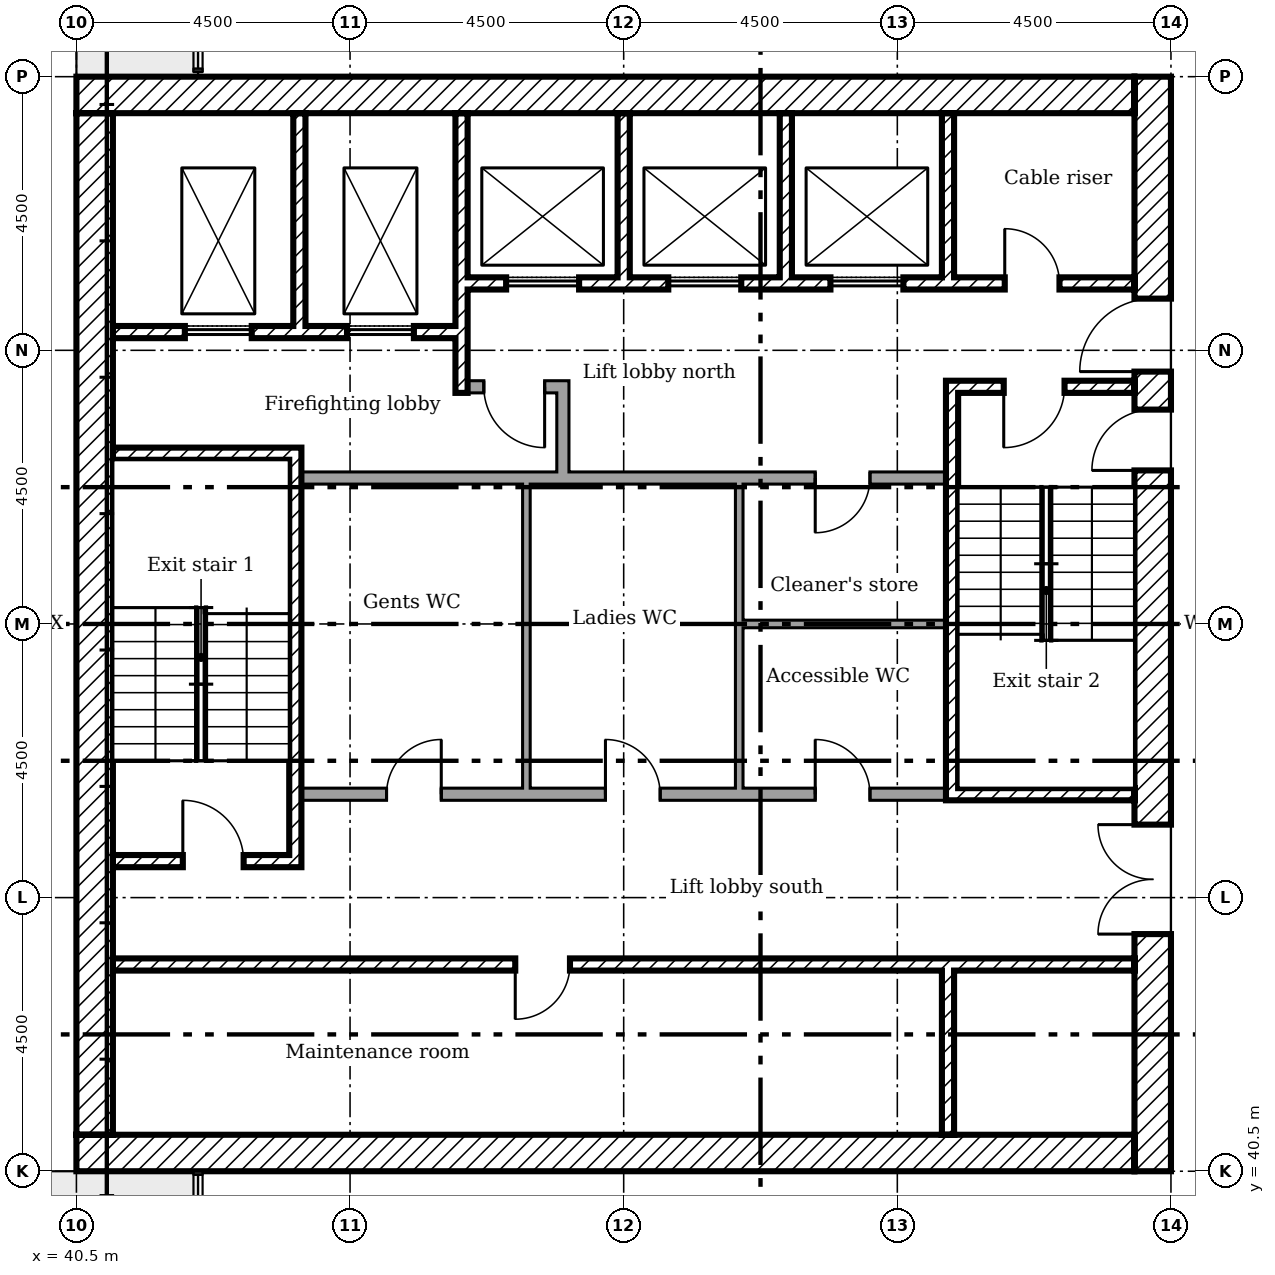
"""IFC4 building model, lengths in metres.
Left out: names, types, materials, properties, quantities, classifications, styles, units other than length and angle.
Written with IfcOpenShell. Run it as: python <this file> out.ifc"""

import sys

from ifc_helpers import new_model, si_unit, direction, frame, frame_2d, origin, place, context, subcontext, project, spatial, rectangle, extrude, element, fill, save


model = new_model("IFC4")
c1 = context("Model", 3, precision=1e-05, world=origin(), true_north=direction((0.0, 1.0)))
c2 = subcontext(c1, "Body", "Model", "MODEL_VIEW")
j1 = project(units=[si_unit("LENGTHUNIT", "METRE"), si_unit("PLANEANGLEUNIT", "RADIAN")], contexts=[c1])
p1 = place(None, origin())
s1 = spatial("IfcSite", under=j1, at=p1, CompositionType="ELEMENT")
p2 = place(p1, origin())
s2 = spatial("IfcBuilding", under=s1, at=p2, CompositionType="ELEMENT")
p3 = place(p2, frame((0.0, 0.0, 143.8)))
s3 = spatial("IfcBuildingStorey", under=s2, at=p3, CompositionType="ELEMENT", Elevation=143.8)
p4 = place(p3, frame((58.2, 40.5, 0.0), z_axis=(0.0, 0.0, 1.0), x_axis=(0.0, 1.0, 0.0)))
e1 = element("IfcWall", 1, at=p4, inside=s3, PredefinedType="SHEAR", context=c2, shape_type="SweptSolid", body=[
    extrude(rectangle(XDim=18.0, YDim=0.6, at=frame_2d((9.0, 0.0))), origin(), (0.0, 0.0, 1.0), 3.35),
])
p5 = place(p4, frame((13.15, 0.0, 0.0)))
e2 = element("IfcOpeningElement", 2, at=p5, cuts=e1, PredefinedType="OPENING", context=c2, shape_type="SweptSolid", body=[
    extrude(rectangle(XDim=1.2, YDim=2.1, at=frame_2d((0.6, 1.05))), frame((0.0, 0.31, 0.0), z_axis=(0.0, -1.0, 0.0), x_axis=(1.0, 0.0, 0.0)), (0.0, 0.0, 1.0), 0.62),
])
p6 = place(p4, frame((3.9, 0.0, 0.0)))
e3 = element("IfcOpeningElement", 3, at=p6, cuts=e1, PredefinedType="OPENING", context=c2, shape_type="SweptSolid", body=[
    extrude(rectangle(XDim=1.8, YDim=2.1, at=frame_2d((0.9, 1.05))), frame((0.0, 0.31, 0.0), z_axis=(0.0, -1.0, 0.0), x_axis=(1.0, 0.0, 0.0)), (0.0, 0.0, 1.0), 0.62),
])
p7 = place(p4, frame((11.525, 0.0, 0.0)))
e4 = element("IfcOpeningElement", 4, at=p7, cuts=e1, PredefinedType="OPENING", context=c2, shape_type="SweptSolid", body=[
    extrude(rectangle(XDim=1.0, YDim=2.1, at=frame_2d((0.5, 1.05))), frame((0.0, 0.31, 0.0), z_axis=(0.0, -1.0, 0.0), x_axis=(1.0, 0.0, 0.0)), (0.0, 0.0, 1.0), 0.62),
])
for number, where in (
    (5, (40.5, 58.2, 0.0)),
    (6, (40.5, 40.8, 0.0)),
):
    element("IfcWall", number, at=place(p3, frame(where)), inside=s3, PredefinedType="SHEAR", context=c2, shape_type="SweptSolid", body=[
        extrude(rectangle(XDim=17.4, YDim=0.6, at=frame_2d((8.7, 0.0))), origin(), (0.0, 0.0, 1.0), 3.35),
    ])
p8 = place(p3, frame((40.8, 41.1, 0.0), z_axis=(0.0, 0.0, 1.0), x_axis=(0.0, 1.0, 0.0)))
e7 = element("IfcWall", 7, at=p8, inside=s3, PredefinedType="SHEAR", context=c2, shape_type="SweptSolid", body=[
    extrude(rectangle(XDim=16.8, YDim=0.6, at=frame_2d((8.4, 0.0))), origin(), (0.0, 0.0, 1.0), 3.35),
])
p9 = place(p3, frame((44.167, 57.9, 0.0), z_axis=(0.0, 0.0, 1.0), x_axis=(0.0, -1.0, 0.0)))
e8 = element("IfcWall", 8, at=p9, inside=s3, PredefinedType="SHEAR", context=c2, shape_type="SweptSolid", body=[
    extrude(rectangle(XDim=3.5, YDim=0.2, at=frame_2d((1.75, 0.0))), origin(), (0.0, 0.0, 1.0), 3.35),
])
p10 = place(p3, frame((46.833, 57.9, 0.0), z_axis=(0.0, 0.0, 1.0), x_axis=(0.0, -1.0, 0.0)))
e9 = element("IfcWall", 9, at=p10, inside=s3, PredefinedType="SHEAR", context=c2, shape_type="SweptSolid", body=[
    extrude(rectangle(XDim=4.6, YDim=0.2, at=frame_2d((2.3, 0.0))), origin(), (0.0, 0.0, 1.0), 3.35),
])
for number, where, z_axis, x_axis in (
    (10, (49.5, 57.9, 0.0), (0.0, 0.0, 1.0), (0.0, -1.0, 0.0)),
    (11, (52.167, 57.9, 0.0), (0.0, 0.0, 1.0), (0.0, -1.0, 0.0)),
    (12, (54.833, 57.9, 0.0), (0.0, 0.0, 1.0), (0.0, -1.0, 0.0)),
    (13, (54.833, 41.1, 0.0), (0.0, 0.0, 1.0), (0.0, 1.0, 0.0)),
):
    element("IfcWall", number, at=place(p3, frame(where, z_axis=z_axis, x_axis=x_axis)), inside=s3, PredefinedType="SHEAR", context=c2, shape_type="SweptSolid", body=[
        extrude(rectangle(XDim=2.7, YDim=0.2, at=frame_2d((1.35, 0.0))), origin(), (0.0, 0.0, 1.0), 3.35),
    ])
p11 = place(p3, frame((48.5, 51.9, 0.0), z_axis=(0.0, 0.0, 1.0), x_axis=(0.0, 1.0, 0.0)))
e14 = element("IfcWall", 14, at=p11, inside=s3, PredefinedType="PARTITIONING", context=c2, shape_type="SweptSolid", body=[
    extrude(rectangle(XDim=1.6, YDim=0.2, at=frame_2d((0.8, 0.0))), origin(), (0.0, 0.0, 1.0), 3.35),
])
p12 = place(p3, frame((46.933, 53.4, 0.0)))
e15 = element("IfcWall", 15, at=p12, inside=s3, PredefinedType="PARTITIONING", context=c2, shape_type="SweptSolid", body=[
    extrude(rectangle(XDim=1.467, YDim=0.2, at=frame_2d((0.733, 0.0))), origin(), (0.0, 0.0, 1.0), 3.35),
])
p13 = place(p12, frame((0.267, 0.0, 0.0)))
e16 = element("IfcOpeningElement", 16, at=p13, cuts=e15, PredefinedType="OPENING", context=c2, shape_type="SweptSolid", body=[
    extrude(rectangle(XDim=1.0, YDim=2.1, at=frame_2d((0.5, 1.05))), frame((0.0, 0.11, 0.0), z_axis=(0.0, -1.0, 0.0), x_axis=(1.0, 0.0, 0.0)), (0.0, 0.0, 1.0), 0.22),
])
p14 = place(p3, frame((46.933, 55.1, 0.0)))
e17 = element("IfcWall", 17, at=p14, inside=s3, PredefinedType="SHEAR", context=c2, shape_type="SweptSolid", body=[
    extrude(rectangle(XDim=10.967, YDim=0.2, at=frame_2d((5.483, 0.0))), origin(), (0.0, 0.0, 1.0), 3.35),
])
p15 = place(p14, frame((8.833, 0.0, 0.0)))
e18 = element("IfcOpeningElement", 18, at=p15, cuts=e17, PredefinedType="OPENING", context=c2, shape_type="SweptSolid", body=[
    extrude(rectangle(XDim=0.9, YDim=2.1, at=frame_2d((0.45, 1.05))), frame((0.0, 0.11, 0.0), z_axis=(0.0, -1.0, 0.0), x_axis=(1.0, 0.0, 0.0)), (0.0, 0.0, 1.0), 0.22),
])
p16 = place(p14, frame((0.633, 0.0, 0.0)))
e19 = element("IfcOpeningElement", 19, at=p16, cuts=e17, PredefinedType="OPENING", context=c2, shape_type="SweptSolid", body=[
    extrude(rectangle(XDim=1.2, YDim=2.1, at=frame_2d((0.6, 1.05))), frame((0.0, 0.11, 0.0), z_axis=(0.0, -1.0, 0.0), x_axis=(1.0, 0.0, 0.0)), (0.0, 0.0, 1.0), 0.22),
])
p17 = place(p14, frame((3.3, 0.0, 0.0)))
e20 = element("IfcOpeningElement", 20, at=p17, cuts=e17, PredefinedType="OPENING", context=c2, shape_type="SweptSolid", body=[
    extrude(rectangle(XDim=1.2, YDim=2.1, at=frame_2d((0.6, 1.05))), frame((0.0, 0.11, 0.0), z_axis=(0.0, -1.0, 0.0), x_axis=(1.0, 0.0, 0.0)), (0.0, 0.0, 1.0), 0.22),
])
p18 = place(p14, frame((5.967, 0.0, 0.0)))
e21 = element("IfcOpeningElement", 21, at=p18, cuts=e17, PredefinedType="OPENING", context=c2, shape_type="SweptSolid", body=[
    extrude(rectangle(XDim=1.2, YDim=2.1, at=frame_2d((0.6, 1.05))), frame((0.0, 0.11, 0.0), z_axis=(0.0, -1.0, 0.0), x_axis=(1.0, 0.0, 0.0)), (0.0, 0.0, 1.0), 0.22),
])
p19 = place(p3, frame((41.1, 54.3, 0.0)))
e22 = element("IfcWall", 22, at=p19, inside=s3, PredefinedType="SHEAR", context=c2, shape_type="SweptSolid", body=[
    extrude(rectangle(XDim=5.633, YDim=0.2, at=frame_2d((2.817, 0.0))), origin(), (0.0, 0.0, 1.0), 3.35),
])
p20 = place(p19, frame((1.183, 0.0, 0.0)))
e23 = element("IfcOpeningElement", 23, at=p20, cuts=e22, PredefinedType="OPENING", context=c2, shape_type="SweptSolid", body=[
    extrude(rectangle(XDim=1.1, YDim=2.1, at=frame_2d((0.55, 1.05))), frame((0.0, 0.11, 0.0), z_axis=(0.0, -1.0, 0.0), x_axis=(1.0, 0.0, 0.0)), (0.0, 0.0, 1.0), 0.22),
])
p21 = place(p19, frame((3.85, 0.0, 0.0)))
e24 = element("IfcOpeningElement", 24, at=p21, cuts=e22, PredefinedType="OPENING", context=c2, shape_type="SweptSolid", body=[
    extrude(rectangle(XDim=1.1, YDim=2.1, at=frame_2d((0.55, 1.05))), frame((0.0, 0.11, 0.0), z_axis=(0.0, -1.0, 0.0), x_axis=(1.0, 0.0, 0.0)), (0.0, 0.0, 1.0), 0.22),
])
p22 = place(p3, frame((41.1, 43.9, 0.0)))
e25 = element("IfcWall", 25, at=p22, inside=s3, PredefinedType="SHEAR", context=c2, shape_type="SweptSolid", body=[
    extrude(rectangle(XDim=16.8, YDim=0.2, at=frame_2d((8.4, 0.0))), origin(), (0.0, 0.0, 1.0), 3.35),
])
p23 = place(p22, frame((6.617, 0.0, 0.0)))
e26 = element("IfcOpeningElement", 26, at=p23, cuts=e25, PredefinedType="OPENING", context=c2, shape_type="SweptSolid", body=[
    extrude(rectangle(XDim=0.9, YDim=2.1, at=frame_2d((0.45, 1.05))), frame((0.0, 0.11, 0.0), z_axis=(0.0, -1.0, 0.0), x_axis=(1.0, 0.0, 0.0)), (0.0, 0.0, 1.0), 0.22),
])
p24 = place(p3, frame((44.1, 45.5, 0.0), z_axis=(0.0, 0.0, 1.0), x_axis=(0.0, 1.0, 0.0)))
e27 = element("IfcWall", 27, at=p24, inside=s3, PredefinedType="SHEAR", context=c2, shape_type="SweptSolid", body=[
    extrude(rectangle(XDim=6.9, YDim=0.2, at=frame_2d((3.45, 0.0))), origin(), (0.0, 0.0, 1.0), 3.35),
])
p25 = place(p3, frame((41.1, 52.3, 0.0)))
e28 = element("IfcWall", 28, at=p25, inside=s3, PredefinedType="SHEAR", context=c2, shape_type="SweptSolid", body=[
    extrude(rectangle(XDim=2.9, YDim=0.2, at=frame_2d((1.45, 0.0))), origin(), (0.0, 0.0, 1.0), 3.35),
])
p26 = place(p3, frame((41.1, 45.6, 0.0)))
e29 = element("IfcWall", 29, at=p26, inside=s3, PredefinedType="SHEAR", context=c2, shape_type="SweptSolid", body=[
    extrude(rectangle(XDim=2.9, YDim=0.2, at=frame_2d((1.45, 0.0))), origin(), (0.0, 0.0, 1.0), 3.35),
])
p27 = place(p26, frame((1.15, 0.0, 0.0)))
e30 = element("IfcOpeningElement", 30, at=p27, cuts=e29, PredefinedType="OPENING", context=c2, shape_type="SweptSolid", body=[
    extrude(rectangle(XDim=1.0, YDim=2.1, at=frame_2d((0.5, 1.05))), frame((0.0, 0.11, 0.0), z_axis=(0.0, -1.0, 0.0), x_axis=(1.0, 0.0, 0.0)), (0.0, 0.0, 1.0), 0.22),
])
p28 = place(p3, frame((54.8, 53.4, 0.0)))
e31 = element("IfcWall", 31, at=p28, inside=s3, PredefinedType="SHEAR", context=c2, shape_type="SweptSolid", body=[
    extrude(rectangle(XDim=3.1, YDim=0.2, at=frame_2d((1.55, 0.0))), origin(), (0.0, 0.0, 1.0), 3.35),
])
p29 = place(p28, frame((0.95, 0.0, 0.0)))
e32 = element("IfcOpeningElement", 32, at=p29, cuts=e31, PredefinedType="OPENING", context=c2, shape_type="SweptSolid", body=[
    extrude(rectangle(XDim=1.0, YDim=2.1, at=frame_2d((0.5, 1.05))), frame((0.0, 0.11, 0.0), z_axis=(0.0, -1.0, 0.0), x_axis=(1.0, 0.0, 0.0)), (0.0, 0.0, 1.0), 0.22),
])
p30 = place(p3, frame((54.8, 46.7, 0.0)))
e33 = element("IfcWall", 33, at=p30, inside=s3, PredefinedType="SHEAR", context=c2, shape_type="SweptSolid", body=[
    extrude(rectangle(XDim=3.1, YDim=0.2, at=frame_2d((1.55, 0.0))), origin(), (0.0, 0.0, 1.0), 3.35),
])
p31 = place(p3, frame((54.9, 46.8, 0.0), z_axis=(0.0, 0.0, 1.0), x_axis=(0.0, 1.0, 0.0)))
e34 = element("IfcWall", 34, at=p31, inside=s3, PredefinedType="SHEAR", context=c2, shape_type="SweptSolid", body=[
    extrude(rectangle(XDim=6.5, YDim=0.2, at=frame_2d((3.25, 0.0))), origin(), (0.0, 0.0, 1.0), 3.35),
])
p32 = place(p3, frame((44.2, 51.9, 0.0)))
e35 = element("IfcWall", 35, at=p32, inside=s3, PredefinedType="PARTITIONING", context=c2, shape_type="SweptSolid", body=[
    extrude(rectangle(XDim=10.6, YDim=0.2, at=frame_2d((5.3, 0.0))), origin(), (0.0, 0.0, 1.0), 3.35),
])
p33 = place(p32, frame((8.45, 0.0, 0.0)))
e36 = element("IfcOpeningElement", 36, at=p33, cuts=e35, PredefinedType="OPENING", context=c2, shape_type="SweptSolid", body=[
    extrude(rectangle(XDim=0.9, YDim=2.1, at=frame_2d((0.45, 1.05))), frame((0.0, 0.11, 0.0), z_axis=(0.0, -1.0, 0.0), x_axis=(1.0, 0.0, 0.0)), (0.0, 0.0, 1.0), 0.22),
])
p34 = place(p3, frame((44.2, 46.7, 0.0)))
e37 = element("IfcWall", 37, at=p34, inside=s3, PredefinedType="PARTITIONING", context=c2, shape_type="SweptSolid", body=[
    extrude(rectangle(XDim=10.6, YDim=0.2, at=frame_2d((5.3, 0.0))), origin(), (0.0, 0.0, 1.0), 3.35),
])
p35 = place(p34, frame((1.4, 0.0, 0.0)))
e38 = element("IfcOpeningElement", 38, at=p35, cuts=e37, PredefinedType="OPENING", context=c2, shape_type="SweptSolid", body=[
    extrude(rectangle(XDim=0.9, YDim=2.1, at=frame_2d((0.45, 1.05))), frame((0.0, 0.11, 0.0), z_axis=(0.0, -1.0, 0.0), x_axis=(1.0, 0.0, 0.0)), (0.0, 0.0, 1.0), 0.22),
])
p36 = place(p34, frame((5.0, 0.0, 0.0)))
e39 = element("IfcOpeningElement", 39, at=p36, cuts=e37, PredefinedType="OPENING", context=c2, shape_type="SweptSolid", body=[
    extrude(rectangle(XDim=0.9, YDim=2.1, at=frame_2d((0.45, 1.05))), frame((0.0, 0.11, 0.0), z_axis=(0.0, -1.0, 0.0), x_axis=(1.0, 0.0, 0.0)), (0.0, 0.0, 1.0), 0.22),
])
p37 = place(p34, frame((8.45, 0.0, 0.0)))
e40 = element("IfcOpeningElement", 40, at=p37, cuts=e37, PredefinedType="OPENING", context=c2, shape_type="SweptSolid", body=[
    extrude(rectangle(XDim=0.9, YDim=2.1, at=frame_2d((0.45, 1.05))), frame((0.0, 0.11, 0.0), z_axis=(0.0, -1.0, 0.0), x_axis=(1.0, 0.0, 0.0)), (0.0, 0.0, 1.0), 0.22),
])
p38 = place(p3, frame((47.9, 46.8, 0.0), z_axis=(0.0, 0.0, 1.0), x_axis=(0.0, 1.0, 0.0)))
e41 = element("IfcWall", 41, at=p38, inside=s3, PredefinedType="PARTITIONING", context=c2, shape_type="SweptSolid", body=[
    extrude(rectangle(XDim=5.0, YDim=0.125, at=frame_2d((2.5, 0.0))), origin(), (0.0, 0.0, 1.0), 3.35),
])
p39 = place(p3, frame((51.4, 46.8, 0.0), z_axis=(0.0, 0.0, 1.0), x_axis=(0.0, 1.0, 0.0)))
e42 = element("IfcWall", 42, at=p39, inside=s3, PredefinedType="PARTITIONING", context=c2, shape_type="SweptSolid", body=[
    extrude(rectangle(XDim=2.762, YDim=0.125, at=frame_2d((1.381, 0.0))), origin(), (0.0, 0.0, 1.0), 3.35),
])
p40 = place(p3, frame((54.8, 49.5, 0.0), z_axis=(0.0, 0.0, 1.0), x_axis=(-1.0, 0.0, 0.0)))
e43 = element("IfcWall", 43, at=p40, inside=s3, PredefinedType="PARTITIONING", context=c2, shape_type="SweptSolid", body=[
    extrude(rectangle(XDim=3.338, YDim=0.125, at=frame_2d((1.669, 0.0))), origin(), (0.0, 0.0, 1.0), 3.35),
])
p41 = place(p3, frame((51.4, 49.5, 0.0), z_axis=(0.0, 0.0, 1.0), x_axis=(0.0, 1.0, 0.0)))
e44 = element("IfcWall", 44, at=p41, inside=s3, PredefinedType="PARTITIONING", context=c2, shape_type="SweptSolid", body=[
    extrude(rectangle(XDim=2.3, YDim=0.125, at=frame_2d((1.15, 0.0))), origin(), (0.0, 0.0, 1.0), 3.35),
])
p42 = place(p5, origin())
e45 = element("IfcDoor", 45, at=p42, inside=s3, OperationType="SINGLE_SWING_RIGHT", PredefinedType="DOOR", context=c2, shape_type="SweptSolid", body=[
    extrude(rectangle(XDim=1.2, YDim=2.1, at=frame_2d((0.6, 1.05))), frame((0.0, 0.025, 0.0), z_axis=(0.0, -1.0, 0.0), x_axis=(1.0, 0.0, 0.0)), (0.0, 0.0, 1.0), 0.05),
])
fill(e2, e45)
p43 = place(p6, origin())
e46 = element("IfcDoor", 46, at=p43, inside=s3, OperationType="DOUBLE_DOOR_SINGLE_SWING", PredefinedType="DOOR", context=c2, shape_type="SweptSolid", body=[
    extrude(rectangle(XDim=1.8, YDim=2.1, at=frame_2d((0.9, 1.05))), frame((0.0, 0.025, 0.0), z_axis=(0.0, -1.0, 0.0), x_axis=(1.0, 0.0, 0.0)), (0.0, 0.0, 1.0), 0.05),
])
fill(e3, e46)
p44 = place(p27, origin())
e47 = element("IfcDoor", 47, at=p44, inside=s3, OperationType="SINGLE_SWING_RIGHT", PredefinedType="DOOR", context=c2, shape_type="SweptSolid", body=[
    extrude(rectangle(XDim=1.0, YDim=2.1, at=frame_2d((0.5, 1.05))), frame((0.0, 0.025, 0.0), z_axis=(0.0, -1.0, 0.0), x_axis=(1.0, 0.0, 0.0)), (0.0, 0.0, 1.0), 0.05),
])
fill(e30, e47)
p45 = place(p29, frame((1.0, 0.0, 0.0), x_axis=(-1.0, 0.0, 0.0)))
e48 = element("IfcDoor", 48, at=p45, inside=s3, OperationType="SINGLE_SWING_LEFT", PredefinedType="DOOR", context=c2, shape_type="SweptSolid", body=[
    extrude(rectangle(XDim=1.0, YDim=2.1, at=frame_2d((0.5, 1.05))), frame((0.0, 0.025, 0.0), z_axis=(0.0, -1.0, 0.0), x_axis=(1.0, 0.0, 0.0)), (0.0, 0.0, 1.0), 0.05),
])
fill(e32, e48)
p46 = place(p7, origin())
e49 = element("IfcDoor", 49, at=p46, inside=s3, OperationType="SINGLE_SWING_RIGHT", PredefinedType="DOOR", context=c2, shape_type="SweptSolid", body=[
    extrude(rectangle(XDim=1.0, YDim=2.1, at=frame_2d((0.5, 1.05))), frame((0.0, 0.025, 0.0), z_axis=(0.0, -1.0, 0.0), x_axis=(1.0, 0.0, 0.0)), (0.0, 0.0, 1.0), 0.05),
])
fill(e4, e49)
p47 = place(p13, frame((1.0, 0.0, 0.0), x_axis=(-1.0, 0.0, 0.0)))
e50 = element("IfcDoor", 50, at=p47, inside=s3, OperationType="SINGLE_SWING_RIGHT", PredefinedType="DOOR", context=c2, shape_type="SweptSolid", body=[
    extrude(rectangle(XDim=1.0, YDim=2.1, at=frame_2d((0.5, 1.05))), frame((0.0, 0.025, 0.0), z_axis=(0.0, -1.0, 0.0), x_axis=(1.0, 0.0, 0.0)), (0.0, 0.0, 1.0), 0.05),
])
fill(e16, e50)
p48 = place(p15, origin())
e51 = element("IfcDoor", 51, at=p48, inside=s3, OperationType="SINGLE_SWING_RIGHT", PredefinedType="DOOR", context=c2, shape_type="SweptSolid", body=[
    extrude(rectangle(XDim=0.9, YDim=2.1, at=frame_2d((0.45, 1.05))), frame((0.0, 0.025, 0.0), z_axis=(0.0, -1.0, 0.0), x_axis=(1.0, 0.0, 0.0)), (0.0, 0.0, 1.0), 0.05),
])
fill(e18, e51)
p49 = place(p23, frame((0.9, 0.0, 0.0), x_axis=(-1.0, 0.0, 0.0)))
e52 = element("IfcDoor", 52, at=p49, inside=s3, OperationType="SINGLE_SWING_LEFT", PredefinedType="DOOR", context=c2, shape_type="SweptSolid", body=[
    extrude(rectangle(XDim=0.9, YDim=2.1, at=frame_2d((0.45, 1.05))), frame((0.0, 0.025, 0.0), z_axis=(0.0, -1.0, 0.0), x_axis=(1.0, 0.0, 0.0)), (0.0, 0.0, 1.0), 0.05),
])
fill(e26, e52)
p50 = place(p35, origin())
e53 = element("IfcDoor", 53, at=p50, inside=s3, OperationType="SINGLE_SWING_LEFT", PredefinedType="DOOR", context=c2, shape_type="SweptSolid", body=[
    extrude(rectangle(XDim=0.9, YDim=2.1, at=frame_2d((0.45, 1.05))), frame((0.0, 0.025, 0.0), z_axis=(0.0, -1.0, 0.0), x_axis=(1.0, 0.0, 0.0)), (0.0, 0.0, 1.0), 0.05),
])
fill(e38, e53)
p51 = place(p36, origin())
e54 = element("IfcDoor", 54, at=p51, inside=s3, OperationType="SINGLE_SWING_RIGHT", PredefinedType="DOOR", context=c2, shape_type="SweptSolid", body=[
    extrude(rectangle(XDim=0.9, YDim=2.1, at=frame_2d((0.45, 1.05))), frame((0.0, 0.025, 0.0), z_axis=(0.0, -1.0, 0.0), x_axis=(1.0, 0.0, 0.0)), (0.0, 0.0, 1.0), 0.05),
])
fill(e39, e54)
p52 = place(p37, origin())
e55 = element("IfcDoor", 55, at=p52, inside=s3, OperationType="SINGLE_SWING_RIGHT", PredefinedType="DOOR", context=c2, shape_type="SweptSolid", body=[
    extrude(rectangle(XDim=0.9, YDim=2.1, at=frame_2d((0.45, 1.05))), frame((0.0, 0.025, 0.0), z_axis=(0.0, -1.0, 0.0), x_axis=(1.0, 0.0, 0.0)), (0.0, 0.0, 1.0), 0.05),
])
fill(e40, e55)
p53 = place(p33, frame((0.9, 0.0, 0.0), x_axis=(-1.0, 0.0, 0.0)))
e56 = element("IfcDoor", 56, at=p53, inside=s3, OperationType="SINGLE_SWING_LEFT", PredefinedType="DOOR", context=c2, shape_type="SweptSolid", body=[
    extrude(rectangle(XDim=0.9, YDim=2.1, at=frame_2d((0.45, 1.05))), frame((0.0, 0.025, 0.0), z_axis=(0.0, -1.0, 0.0), x_axis=(1.0, 0.0, 0.0)), (0.0, 0.0, 1.0), 0.05),
])
fill(e36, e56)
p54 = place(p20, origin())
e57 = element("IfcDoor", 57, at=p54, inside=s3, OperationType="SLIDING_TO_LEFT", PredefinedType="DOOR", context=c2, shape_type="SweptSolid", body=[
    extrude(rectangle(XDim=1.1, YDim=2.1, at=frame_2d((0.55, 1.05))), frame((0.0, 0.025, 0.0), z_axis=(0.0, -1.0, 0.0), x_axis=(1.0, 0.0, 0.0)), (0.0, 0.0, 1.0), 0.05),
])
fill(e23, e57)
p55 = place(p21, origin())
e58 = element("IfcDoor", 58, at=p55, inside=s3, OperationType="SLIDING_TO_LEFT", PredefinedType="DOOR", context=c2, shape_type="SweptSolid", body=[
    extrude(rectangle(XDim=1.1, YDim=2.1, at=frame_2d((0.55, 1.05))), frame((0.0, 0.025, 0.0), z_axis=(0.0, -1.0, 0.0), x_axis=(1.0, 0.0, 0.0)), (0.0, 0.0, 1.0), 0.05),
])
fill(e24, e58)
p56 = place(p16, origin())
e59 = element("IfcDoor", 59, at=p56, inside=s3, OperationType="SLIDING_TO_LEFT", PredefinedType="DOOR", context=c2, shape_type="SweptSolid", body=[
    extrude(rectangle(XDim=1.2, YDim=2.1, at=frame_2d((0.6, 1.05))), frame((0.0, 0.025, 0.0), z_axis=(0.0, -1.0, 0.0), x_axis=(1.0, 0.0, 0.0)), (0.0, 0.0, 1.0), 0.05),
])
fill(e19, e59)
p57 = place(p17, origin())
e60 = element("IfcDoor", 60, at=p57, inside=s3, OperationType="SLIDING_TO_LEFT", PredefinedType="DOOR", context=c2, shape_type="SweptSolid", body=[
    extrude(rectangle(XDim=1.2, YDim=2.1, at=frame_2d((0.6, 1.05))), frame((0.0, 0.025, 0.0), z_axis=(0.0, -1.0, 0.0), x_axis=(1.0, 0.0, 0.0)), (0.0, 0.0, 1.0), 0.05),
])
fill(e20, e60)
p58 = place(p18, origin())
e61 = element("IfcDoor", 61, at=p58, inside=s3, OperationType="SLIDING_TO_LEFT", PredefinedType="DOOR", context=c2, shape_type="SweptSolid", body=[
    extrude(rectangle(XDim=1.2, YDim=2.1, at=frame_2d((0.6, 1.05))), frame((0.0, 0.025, 0.0), z_axis=(0.0, -1.0, 0.0), x_axis=(1.0, 0.0, 0.0)), (0.0, 0.0, 1.0), 0.05),
])
fill(e21, e61)
save(model, sys.argv[1])
